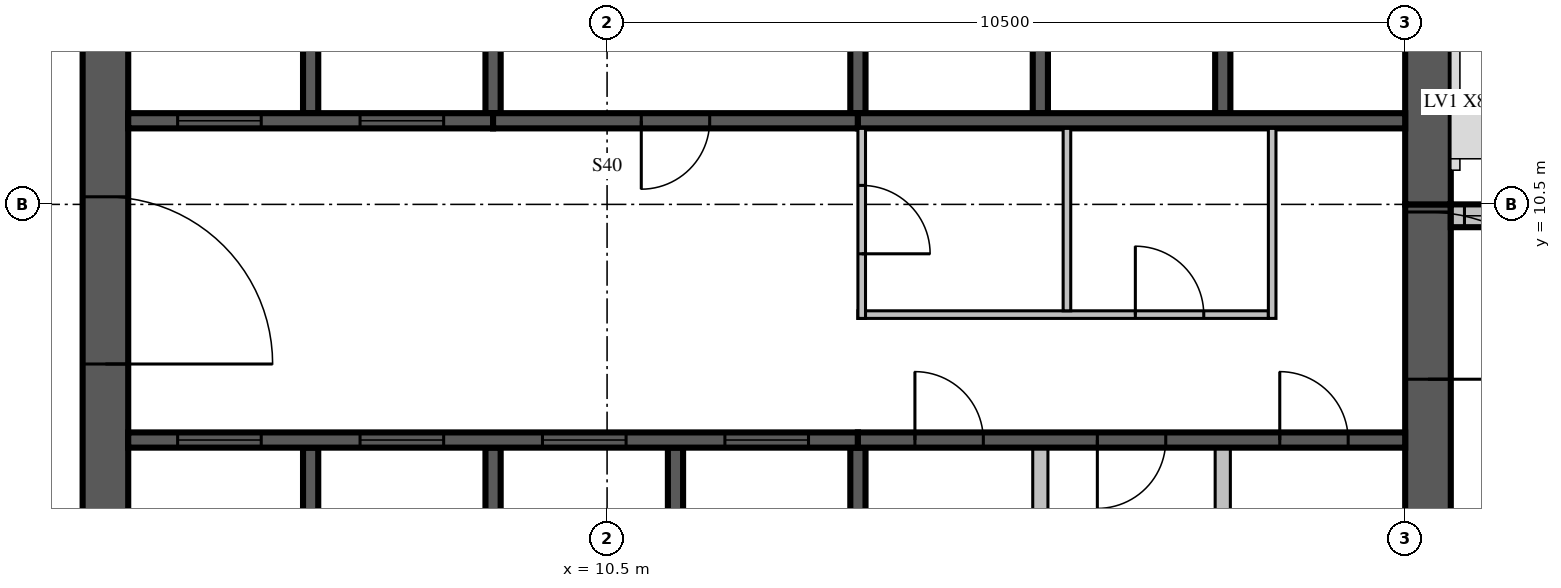
"""IFC4 building model, lengths in metres.
Left out: names, types, materials, properties, quantities, classifications, styles, units other than length and angle.
Written with IfcOpenShell. Run it as: python <this file> out.ifc"""

import sys

from ifc_helpers import new_model, si_unit, direction, frame, frame_2d, origin, place, context, subcontext, project, spatial, rectangle, extrude, source, transform, mapped, element, fill, save


model = new_model("IFC4")
c1 = context("Model", 3, precision=1e-05, world=origin(), true_north=direction((0.0, 1.0)))
c2 = subcontext(c1, "Body", "Model", "MODEL_VIEW")
j1 = project(units=[si_unit("LENGTHUNIT", "METRE"), si_unit("PLANEANGLEUNIT", "RADIAN")], contexts=[c1])
p1 = place(None, origin())
s1 = spatial("IfcSite", under=j1, at=p1, CompositionType="ELEMENT")
p2 = place(p1, origin())
s2 = spatial("IfcBuilding", under=s1, at=p2, CompositionType="ELEMENT")
p3 = place(p2, frame((0.0, 0.0, 323.0)))
s3 = spatial("IfcBuildingStorey", under=s2, at=p3, CompositionType="ELEMENT", Elevation=323.0)
m1 = source(origin(), c2, "Body", "SweptSolid", [
    extrude(rectangle(XDim=17.4, YDim=0.6, at=frame_2d((8.7, 0.0))), origin(), (0.0, 0.0, 1.0), 3.5),
])
p4 = place(p3, frame((3.9, 4.2, 0.0), z_axis=(0.0, 0.0, 1.0), x_axis=(0.0, 1.0, 0.0)))
e1 = element("IfcWall", 1, at=p4, inside=s3, PredefinedType="SHEAR", context=c2, shape_type="MappedRepresentation", body=[
    mapped(m1, transform((0.0, 0.0, 0.0), scale=1.0)),
])
m2 = source(origin(), c2, "Body", "SweptSolid", [
    extrude(rectangle(XDim=2.2, YDim=2.1, at=frame_2d((1.1, 1.05))), frame((0.0, 0.31, 0.0), z_axis=(0.0, -1.0, 0.0), x_axis=(1.0, 0.0, 0.0)), (0.0, 0.0, 1.0), 0.62),
])
p5 = place(p4, frame((4.2, 0.0, 0.0)))
e2 = element("IfcOpeningElement", 2, at=p5, cuts=e1, PredefinedType="OPENING", context=c2, shape_type="MappedRepresentation", body=[
    mapped(m2, transform((0.0, 0.0, 0.0), scale=1.0)),
])
m3 = source(origin(), c2, "Body", "SweptSolid", [
    extrude(rectangle(XDim=6.3, YDim=0.6, at=frame_2d((3.15, 0.0))), origin(), (0.0, 0.0, 1.0), 3.5),
])
p6 = place(p3, frame((21.3, 4.2, 0.0), z_axis=(0.0, 0.0, 1.0), x_axis=(0.0, 1.0, 0.0)))
e3 = element("IfcWall", 3, at=p6, inside=s3, PredefinedType="SHEAR", context=c2, shape_type="MappedRepresentation", body=[
    mapped(m3, transform((0.0, 0.0, 0.0), scale=1.0)),
])
p7 = place(p6, frame((4.0, 0.0, 0.0)))
e4 = element("IfcOpeningElement", 4, at=p7, cuts=e3, PredefinedType="OPENING", context=c2, shape_type="MappedRepresentation", body=[
    mapped(m2, transform((0.0, 0.0, 0.0), scale=1.0)),
])
m4 = source(origin(), c2, "Body", "SweptSolid", [
    extrude(rectangle(XDim=10.5, YDim=0.6, at=frame_2d((5.25, 0.0))), origin(), (0.0, 0.0, 1.0), 3.5),
])
p8 = place(p3, frame((21.3, 10.5, 0.0), z_axis=(0.0, 0.0, 1.0), x_axis=(0.0, 1.0, 0.0)))
e5 = element("IfcWall", 5, at=p8, inside=s3, PredefinedType="SHEAR", context=c2, shape_type="MappedRepresentation", body=[
    mapped(m4, transform((0.0, 0.0, 0.0), scale=1.0)),
])
m5 = source(origin(), c2, "Body", "SweptSolid", [
    extrude(rectangle(XDim=1.2, YDim=2.4, at=frame_2d((0.6, 1.2))), frame((0.0, 0.31, 0.0), z_axis=(0.0, -1.0, 0.0), x_axis=(1.0, 0.0, 0.0)), (0.0, 0.0, 1.0), 0.62),
])
p9 = place(p8, frame((5.7, 0.0, 0.6)))
e6 = element("IfcOpeningElement", 6, at=p9, cuts=e5, PredefinedType="OPENING", context=c2, shape_type="MappedRepresentation", body=[
    mapped(m5, transform((0.0, 0.0, 0.0), scale=1.0)),
])
m6 = source(origin(), c2, "Body", "SweptSolid", [
    extrude(rectangle(XDim=7.45, YDim=0.3, at=frame_2d((3.725, 0.0))), origin(), (0.0, 0.0, 1.0), 3.1),
])
p10 = place(p3, frame((29.05, 10.35, 0.0), z_axis=(0.0, 0.0, 1.0), x_axis=(-1.0, 0.0, 0.0)))
e7 = element("IfcWall", 7, at=p10, inside=s3, PredefinedType="STANDARD", context=c2, shape_type="MappedRepresentation", body=[
    mapped(m6, transform((0.0, 0.0, 0.0), scale=1.0)),
])
m7 = source(origin(), c2, "Body", "SweptSolid", [
    extrude(rectangle(XDim=3.0, YDim=2.0, at=frame_2d((1.5, 1.0))), frame((0.0, 0.16, 0.0), z_axis=(0.0, -1.0, 0.0), x_axis=(1.0, 0.0, 0.0)), (0.0, 0.0, 1.0), 0.32),
])
p11 = place(p10, frame((1.09, 0.0, 0.6)))
e8 = element("IfcOpeningElement", 8, at=p11, cuts=e7, PredefinedType="OPENING", context=c2, shape_type="MappedRepresentation", body=[
    mapped(m7, transform((0.0, 0.0, 0.0), scale=1.0)),
])
m8 = source(origin(), c2, "Body", "SweptSolid", [
    extrude(rectangle(XDim=1.8, YDim=2.0, at=frame_2d((0.9, 1.0))), frame((0.0, 0.16, 0.0), z_axis=(0.0, -1.0, 0.0), x_axis=(1.0, 0.0, 0.0)), (0.0, 0.0, 1.0), 0.32),
])
p12 = place(p10, frame((5.47, 0.0, 0.6)))
e9 = element("IfcOpeningElement", 9, at=p12, cuts=e7, PredefinedType="OPENING", context=c2, shape_type="MappedRepresentation", body=[
    mapped(m8, transform((0.0, 0.0, 0.0), scale=1.0)),
])
m9 = source(origin(), c2, "Body", "SweptSolid", [
    extrude(rectangle(XDim=3.1, YDim=0.2, at=frame_2d((1.55, 0.0))), origin(), (0.0, 0.0, 1.0), 3.5),
])
for number, where, z_axis, x_axis in (
    (10, (6.6, 4.2, 0.0), (0.0, 0.0, 1.0), (0.0, 1.0, 0.0)),
    (11, (9.0, 4.2, 0.0), (0.0, 0.0, 1.0), (0.0, 1.0, 0.0)),
    (12, (11.4, 4.2, 0.0), (0.0, 0.0, 1.0), (0.0, 1.0, 0.0)),
):
    element("IfcWall", number, at=place(p3, frame(where, z_axis=z_axis, x_axis=x_axis)), inside=s3, PredefinedType="SOLIDWALL", context=c2, shape_type="MappedRepresentation", body=[
        mapped(m9, transform((0.0, 0.0, 0.0), scale=1.0)),
    ])
m10 = source(origin(), c2, "Body", "SweptSolid", [
    extrude(rectangle(XDim=3.1, YDim=0.2, at=frame_2d((1.55, 0.0))), origin(), (0.0, 0.0, 1.0), 3.1),
])
p13 = place(p3, frame((13.8, 4.2, 0.0), z_axis=(0.0, 0.0, 1.0), x_axis=(0.0, 1.0, 0.0)))
e13 = element("IfcWall", 13, at=p13, inside=s3, PredefinedType="SOLIDWALL", context=c2, shape_type="MappedRepresentation", body=[
    mapped(m10, transform((0.0, 0.0, 0.0), scale=1.0)),
])
m11 = source(origin(), c2, "Body", "SweptSolid", [
    extrude(rectangle(XDim=3.1, YDim=0.2, at=frame_2d((1.55, 0.0))), origin(), (0.0, 0.0, 1.0), 3.1),
])
for number, where, z_axis, x_axis in (
    (14, (16.2, 4.2, 0.0), (0.0, 0.0, 1.0), (0.0, 1.0, 0.0)),
    (15, (18.6, 4.2, 0.0), (0.0, 0.0, 1.0), (0.0, 1.0, 0.0)),
):
    element("IfcWall", number, at=place(p3, frame(where, z_axis=z_axis, x_axis=x_axis)), inside=s3, PredefinedType="PARTITIONING", context=c2, shape_type="MappedRepresentation", body=[
        mapped(m11, transform((0.0, 0.0, 0.0), scale=1.0)),
    ])
m12 = source(origin(), c2, "Body", "SweptSolid", [
    extrude(rectangle(XDim=3.0, YDim=0.2, at=frame_2d((1.5, 0.0))), origin(), (0.0, 0.0, 1.0), 3.5),
])
p14 = place(p3, frame((6.6, 11.7, 0.0), z_axis=(0.0, 0.0, 1.0), x_axis=(0.0, 1.0, 0.0)))
e16 = element("IfcWall", 16, at=p14, inside=s3, PredefinedType="SOLIDWALL", context=c2, shape_type="MappedRepresentation", body=[
    mapped(m12, transform((0.0, 0.0, 0.0), scale=1.0)),
])
m13 = source(origin(), c2, "Body", "SweptSolid", [
    extrude(rectangle(XDim=3.0, YDim=0.2, at=frame_2d((1.5, 0.0))), origin(), (0.0, 0.0, 1.0), 3.1),
])
for number, where, z_axis, x_axis in (
    (17, (9.0, 11.7, 0.0), (0.0, 0.0, 1.0), (0.0, 1.0, 0.0)),
    (18, (13.8, 11.7, 0.0), (0.0, 0.0, 1.0), (0.0, 1.0, 0.0)),
):
    element("IfcWall", number, at=place(p3, frame(where, z_axis=z_axis, x_axis=x_axis)), inside=s3, PredefinedType="SOLIDWALL", context=c2, shape_type="MappedRepresentation", body=[
        mapped(m13, transform((0.0, 0.0, 0.0), scale=1.0)),
    ])
for number, where, z_axis, x_axis in (
    (19, (16.2, 11.7, 0.0), (0.0, 0.0, 1.0), (0.0, 1.0, 0.0)),
    (20, (18.6, 11.7, 0.0), (0.0, 0.0, 1.0), (0.0, 1.0, 0.0)),
):
    element("IfcWall", number, at=place(p3, frame(where, z_axis=z_axis, x_axis=x_axis)), inside=s3, PredefinedType="SOLIDWALL", context=c2, shape_type="MappedRepresentation", body=[
        mapped(m12, transform((0.0, 0.0, 0.0), scale=1.0)),
    ])
m14 = source(origin(), c2, "Body", "SweptSolid", [
    extrude(rectangle(XDim=9.6, YDim=0.2, at=frame_2d((4.8, 0.0))), origin(), (0.0, 0.0, 1.0), 3.5),
])
p15 = place(p3, frame((4.2, 7.4, 0.0), z_axis=(0.0, 0.0, 1.0), x_axis=(1.0, 0.0, 0.0)))
e21 = element("IfcWall", 21, at=p15, inside=s3, PredefinedType="SOLIDWALL", context=c2, shape_type="MappedRepresentation", body=[
    mapped(m14, transform((0.0, 0.0, 0.0), scale=1.0)),
])
m15 = source(origin(), c2, "Body", "SweptSolid", [
    extrude(rectangle(XDim=1.1, YDim=2.1, at=frame_2d((0.55, 1.05))), frame((0.0, 0.11, 0.0), z_axis=(0.0, -1.0, 0.0), x_axis=(1.0, 0.0, 0.0)), (0.0, 0.0, 1.0), 0.22),
])
p16 = place(p15, frame((0.65, 0.0, 0.0)))
e22 = element("IfcOpeningElement", 22, at=p16, cuts=e21, PredefinedType="OPENING", context=c2, shape_type="MappedRepresentation", body=[
    mapped(m15, transform((0.0, 0.0, 0.0), scale=1.0)),
])
p17 = place(p15, frame((3.05, 0.0, 0.0)))
e23 = element("IfcOpeningElement", 23, at=p17, cuts=e21, PredefinedType="OPENING", context=c2, shape_type="MappedRepresentation", body=[
    mapped(m15, transform((0.0, 0.0, 0.0), scale=1.0)),
])
p18 = place(p15, frame((5.45, 0.0, 0.0)))
e24 = element("IfcOpeningElement", 24, at=p18, cuts=e21, PredefinedType="OPENING", context=c2, shape_type="MappedRepresentation", body=[
    mapped(m15, transform((0.0, 0.0, 0.0), scale=1.0)),
])
p19 = place(p15, frame((7.85, 0.0, 0.0)))
e25 = element("IfcOpeningElement", 25, at=p19, cuts=e21, PredefinedType="OPENING", context=c2, shape_type="MappedRepresentation", body=[
    mapped(m15, transform((0.0, 0.0, 0.0), scale=1.0)),
])
m16 = source(origin(), c2, "Body", "SweptSolid", [
    extrude(rectangle(XDim=7.2, YDim=0.2, at=frame_2d((3.6, 0.0))), origin(), (0.0, 0.0, 1.0), 3.1),
])
p20 = place(p3, frame((13.8, 7.4, 0.0), z_axis=(0.0, 0.0, 1.0), x_axis=(1.0, 0.0, 0.0)))
e26 = element("IfcWall", 26, at=p20, inside=s3, PredefinedType="SOLIDWALL", context=c2, shape_type="MappedRepresentation", body=[
    mapped(m16, transform((0.0, 0.0, 0.0), scale=1.0)),
])
m17 = source(origin(), c2, "Body", "SweptSolid", [
    extrude(rectangle(XDim=0.9, YDim=2.1, at=frame_2d((0.45, 1.05))), frame((0.0, 0.11, 0.0), z_axis=(0.0, -1.0, 0.0), x_axis=(1.0, 0.0, 0.0)), (0.0, 0.0, 1.0), 0.22),
])
p21 = place(p20, frame((0.75, 0.0, 0.0)))
e27 = element("IfcOpeningElement", 27, at=p21, cuts=e26, PredefinedType="OPENING", context=c2, shape_type="MappedRepresentation", body=[
    mapped(m17, transform((0.0, 0.0, 0.0), scale=1.0)),
])
p22 = place(p20, frame((3.15, 0.0, 0.0)))
e28 = element("IfcOpeningElement", 28, at=p22, cuts=e26, PredefinedType="OPENING", context=c2, shape_type="MappedRepresentation", body=[
    mapped(m17, transform((0.0, 0.0, 0.0), scale=1.0)),
])
p23 = place(p20, frame((5.55, 0.0, 0.0)))
e29 = element("IfcOpeningElement", 29, at=p23, cuts=e26, PredefinedType="OPENING", context=c2, shape_type="MappedRepresentation", body=[
    mapped(m17, transform((0.0, 0.0, 0.0), scale=1.0)),
])
m18 = source(origin(), c2, "Body", "SweptSolid", [
    extrude(rectangle(XDim=4.8, YDim=0.2, at=frame_2d((2.4, 0.0))), origin(), (0.0, 0.0, 1.0), 3.5),
])
p24 = place(p3, frame((4.2, 11.6, 0.0), z_axis=(0.0, 0.0, 1.0), x_axis=(1.0, 0.0, 0.0)))
e30 = element("IfcWall", 30, at=p24, inside=s3, PredefinedType="SOLIDWALL", context=c2, shape_type="MappedRepresentation", body=[
    mapped(m18, transform((0.0, 0.0, 0.0), scale=1.0)),
])
p25 = place(p24, frame((0.65, 0.0, 0.0)))
e31 = element("IfcOpeningElement", 31, at=p25, cuts=e30, PredefinedType="OPENING", context=c2, shape_type="MappedRepresentation", body=[
    mapped(m15, transform((0.0, 0.0, 0.0), scale=1.0)),
])
p26 = place(p24, frame((3.05, 0.0, 0.0)))
e32 = element("IfcOpeningElement", 32, at=p26, cuts=e30, PredefinedType="OPENING", context=c2, shape_type="MappedRepresentation", body=[
    mapped(m15, transform((0.0, 0.0, 0.0), scale=1.0)),
])
m19 = source(origin(), c2, "Body", "SweptSolid", [
    extrude(rectangle(XDim=4.8, YDim=0.2, at=frame_2d((2.4, 0.0))), origin(), (0.0, 0.0, 1.0), 3.1),
])
p27 = place(p3, frame((9.0, 11.6, 0.0), z_axis=(0.0, 0.0, 1.0), x_axis=(1.0, 0.0, 0.0)))
e33 = element("IfcWall", 33, at=p27, inside=s3, PredefinedType="SOLIDWALL", context=c2, shape_type="MappedRepresentation", body=[
    mapped(m19, transform((0.0, 0.0, 0.0), scale=1.0)),
])
p28 = place(p27, frame((1.95, 0.0, 0.0)))
e34 = element("IfcOpeningElement", 34, at=p28, cuts=e33, PredefinedType="OPENING", context=c2, shape_type="MappedRepresentation", body=[
    mapped(m17, transform((0.0, 0.0, 0.0), scale=1.0)),
])
m20 = source(origin(), c2, "Body", "SweptSolid", [
    extrude(rectangle(XDim=7.2, YDim=0.2, at=frame_2d((3.6, 0.0))), origin(), (0.0, 0.0, 1.0), 3.5),
])
p29 = place(p3, frame((13.8, 11.6, 0.0), z_axis=(0.0, 0.0, 1.0), x_axis=(1.0, 0.0, 0.0)))
e35 = element("IfcWall", 35, at=p29, inside=s3, PredefinedType="SOLIDWALL", context=c2, shape_type="MappedRepresentation", body=[
    mapped(m20, transform((0.0, 0.0, 0.0), scale=1.0)),
])
m21 = source(origin(), c2, "Body", "SweptSolid", [
    extrude(rectangle(XDim=5.4, YDim=0.1, at=frame_2d((2.7, 0.0))), origin(), (0.0, 0.0, 1.0), 3.1),
])
p30 = place(p3, frame((13.8, 9.05, 0.0), z_axis=(0.0, 0.0, 1.0), x_axis=(1.0, 0.0, 0.0)))
e36 = element("IfcWall", 36, at=p30, inside=s3, PredefinedType="PARTITIONING", context=c2, shape_type="MappedRepresentation", body=[
    mapped(m21, transform((0.0, 0.0, 0.0), scale=1.0)),
])
m22 = source(origin(), c2, "Body", "SweptSolid", [
    extrude(rectangle(XDim=0.9, YDim=2.1, at=frame_2d((0.45, 1.05))), frame((0.0, 0.06, 0.0), z_axis=(0.0, -1.0, 0.0), x_axis=(1.0, 0.0, 0.0)), (0.0, 0.0, 1.0), 0.12),
])
p31 = place(p30, frame((3.65, 0.0, 0.0)))
e37 = element("IfcOpeningElement", 37, at=p31, cuts=e36, PredefinedType="OPENING", context=c2, shape_type="MappedRepresentation", body=[
    mapped(m22, transform((0.0, 0.0, 0.0), scale=1.0)),
])
m23 = source(origin(), c2, "Body", "SweptSolid", [
    extrude(rectangle(XDim=2.5, YDim=0.1, at=frame_2d((1.25, 0.0))), origin(), (0.0, 0.0, 1.0), 3.1),
])
p32 = place(p3, frame((13.85, 9.0, 0.0), z_axis=(0.0, 0.0, 1.0), x_axis=(0.0, 1.0, 0.0)))
e38 = element("IfcWall", 38, at=p32, inside=s3, PredefinedType="PARTITIONING", context=c2, shape_type="MappedRepresentation", body=[
    mapped(m23, transform((0.0, 0.0, 0.0), scale=1.0)),
])
p33 = place(p32, frame((0.85, 0.0, 0.0)))
e39 = element("IfcOpeningElement", 39, at=p33, cuts=e38, PredefinedType="OPENING", context=c2, shape_type="MappedRepresentation", body=[
    mapped(m22, transform((0.0, 0.0, 0.0), scale=1.0)),
])
m24 = source(origin(), c2, "Body", "SweptSolid", [
    extrude(rectangle(XDim=2.4, YDim=0.1, at=frame_2d((1.2, 0.0))), origin(), (0.0, 0.0, 1.0), 3.1),
])
p34 = place(p3, frame((16.55, 9.1, 0.0), z_axis=(0.0, 0.0, 1.0), x_axis=(0.0, 1.0, 0.0)))
e40 = element("IfcWall", 40, at=p34, inside=s3, PredefinedType="PARTITIONING", context=c2, shape_type="MappedRepresentation", body=[
    mapped(m24, transform((0.0, 0.0, 0.0), scale=1.0)),
])
p35 = place(p3, frame((19.25, 9.0, 0.0), z_axis=(0.0, 0.0, 1.0), x_axis=(0.0, 1.0, 0.0)))
e41 = element("IfcWall", 41, at=p35, inside=s3, PredefinedType="PARTITIONING", context=c2, shape_type="MappedRepresentation", body=[
    mapped(m23, transform((0.0, 0.0, 0.0), scale=1.0)),
])
m25 = source(origin(), c2, "Body", "SweptSolid", [
    extrude(rectangle(XDim=1.8, YDim=2.0, at=frame_2d((0.9, 1.0))), frame((0.0, 0.03, 0.0), z_axis=(0.0, -1.0, 0.0), x_axis=(1.0, 0.0, 0.0)), (0.0, 0.0, 1.0), 0.06),
])
p36 = place(p12, origin())
e42 = element("IfcWindow", 42, at=p36, inside=s3, PartitioningType="SINGLE_PANEL", PredefinedType="WINDOW", context=c2, shape_type="MappedRepresentation", body=[
    mapped(m25, transform((0.0, 0.0, 0.0), scale=1.0)),
])
fill(e9, e42)
m26 = source(origin(), c2, "Body", "SweptSolid", [
    extrude(rectangle(XDim=1.1, YDim=2.1, at=frame_2d((0.55, 1.05))), frame((0.0, 0.025, 0.0), z_axis=(0.0, -1.0, 0.0), x_axis=(1.0, 0.0, 0.0)), (0.0, 0.0, 1.0), 0.05),
])
p37 = place(p16, origin())
e43 = element("IfcDoor", 43, at=p37, inside=s3, OperationType="SLIDING_TO_LEFT", PredefinedType="DOOR", context=c2, shape_type="MappedRepresentation", body=[
    mapped(m26, transform((0.0, 0.0, 0.0), scale=1.0)),
])
fill(e22, e43)
p38 = place(p17, origin())
e44 = element("IfcDoor", 44, at=p38, inside=s3, OperationType="SLIDING_TO_LEFT", PredefinedType="DOOR", context=c2, shape_type="MappedRepresentation", body=[
    mapped(m26, transform((0.0, 0.0, 0.0), scale=1.0)),
])
fill(e23, e44)
p39 = place(p18, origin())
e45 = element("IfcDoor", 45, at=p39, inside=s3, OperationType="SLIDING_TO_LEFT", PredefinedType="DOOR", context=c2, shape_type="MappedRepresentation", body=[
    mapped(m26, transform((0.0, 0.0, 0.0), scale=1.0)),
])
fill(e24, e45)
p40 = place(p19, origin())
e46 = element("IfcDoor", 46, at=p40, inside=s3, OperationType="SLIDING_TO_LEFT", PredefinedType="DOOR", context=c2, shape_type="MappedRepresentation", body=[
    mapped(m26, transform((0.0, 0.0, 0.0), scale=1.0)),
])
fill(e25, e46)
m27 = source(origin(), c2, "Body", "SweptSolid", [
    extrude(rectangle(XDim=0.9, YDim=2.1, at=frame_2d((0.45, 1.05))), frame((0.0, 0.025, 0.0), z_axis=(0.0, -1.0, 0.0), x_axis=(1.0, 0.0, 0.0)), (0.0, 0.0, 1.0), 0.05),
])
p41 = place(p21, origin())
e47 = element("IfcDoor", 47, at=p41, inside=s3, OperationType="SINGLE_SWING_LEFT", PredefinedType="DOOR", context=c2, shape_type="MappedRepresentation", body=[
    mapped(m27, transform((0.0, 0.0, 0.0), scale=1.0)),
])
fill(e27, e47)
p42 = place(p22, origin())
e48 = element("IfcDoor", 48, at=p42, inside=s3, OperationType="SINGLE_SWING_RIGHT", PredefinedType="DOOR", context=c2, shape_type="MappedRepresentation", body=[
    mapped(m27, transform((0.0, 0.0, 0.0), scale=1.0)),
])
fill(e28, e48)
p43 = place(p23, origin())
e49 = element("IfcDoor", 49, at=p43, inside=s3, OperationType="SINGLE_SWING_LEFT", PredefinedType="DOOR", context=c2, shape_type="MappedRepresentation", body=[
    mapped(m27, transform((0.0, 0.0, 0.0), scale=1.0)),
])
fill(e29, e49)
p44 = place(p25, origin())
e50 = element("IfcDoor", 50, at=p44, inside=s3, OperationType="SLIDING_TO_LEFT", PredefinedType="DOOR", context=c2, shape_type="MappedRepresentation", body=[
    mapped(m26, transform((0.0, 0.0, 0.0), scale=1.0)),
])
fill(e31, e50)
p45 = place(p26, origin())
e51 = element("IfcDoor", 51, at=p45, inside=s3, OperationType="SLIDING_TO_LEFT", PredefinedType="DOOR", context=c2, shape_type="MappedRepresentation", body=[
    mapped(m26, transform((0.0, 0.0, 0.0), scale=1.0)),
])
fill(e32, e51)
p46 = place(p28, origin())
e52 = element("IfcDoor", 52, at=p46, inside=s3, OperationType="SINGLE_SWING_RIGHT", PredefinedType="DOOR", context=c2, shape_type="MappedRepresentation", body=[
    mapped(m27, transform((0.0, 0.0, 0.0), scale=1.0)),
])
fill(e34, e52)
p47 = place(p31, origin())
e53 = element("IfcDoor", 53, at=p47, inside=s3, OperationType="SINGLE_SWING_LEFT", PredefinedType="DOOR", context=c2, shape_type="MappedRepresentation", body=[
    mapped(m27, transform((0.0, 0.0, 0.0), scale=1.0)),
])
fill(e37, e53)
p48 = place(p33, origin())
e54 = element("IfcDoor", 54, at=p48, inside=s3, OperationType="SINGLE_SWING_RIGHT", PredefinedType="DOOR", context=c2, shape_type="MappedRepresentation", body=[
    mapped(m27, transform((0.0, 0.0, 0.0), scale=1.0)),
])
fill(e39, e54)
m28 = source(origin(), c2, "Body", "SweptSolid", [
    extrude(rectangle(XDim=2.2, YDim=2.1, at=frame_2d((1.1, 1.05))), frame((0.0, 0.025, 0.0), z_axis=(0.0, -1.0, 0.0), x_axis=(1.0, 0.0, 0.0)), (0.0, 0.0, 1.0), 0.05),
])
p49 = place(p7, origin())
e55 = element("IfcDoor", 55, at=p49, inside=s3, OperationType="DOUBLE_DOOR_SINGLE_SWING", PredefinedType="DOOR", context=c2, shape_type="MappedRepresentation", body=[
    mapped(m28, transform((0.0, 0.0, 0.0), scale=1.0)),
])
fill(e4, e55)
p50 = place(p5, origin())
e56 = element("IfcDoor", 56, at=p50, inside=s3, OperationType="DOUBLE_DOOR_SINGLE_SWING", PredefinedType="DOOR", context=c2, shape_type="MappedRepresentation", body=[
    mapped(m28, transform((0.0, 0.0, 0.0), scale=1.0)),
])
fill(e2, e56)
save(model, sys.argv[1])
